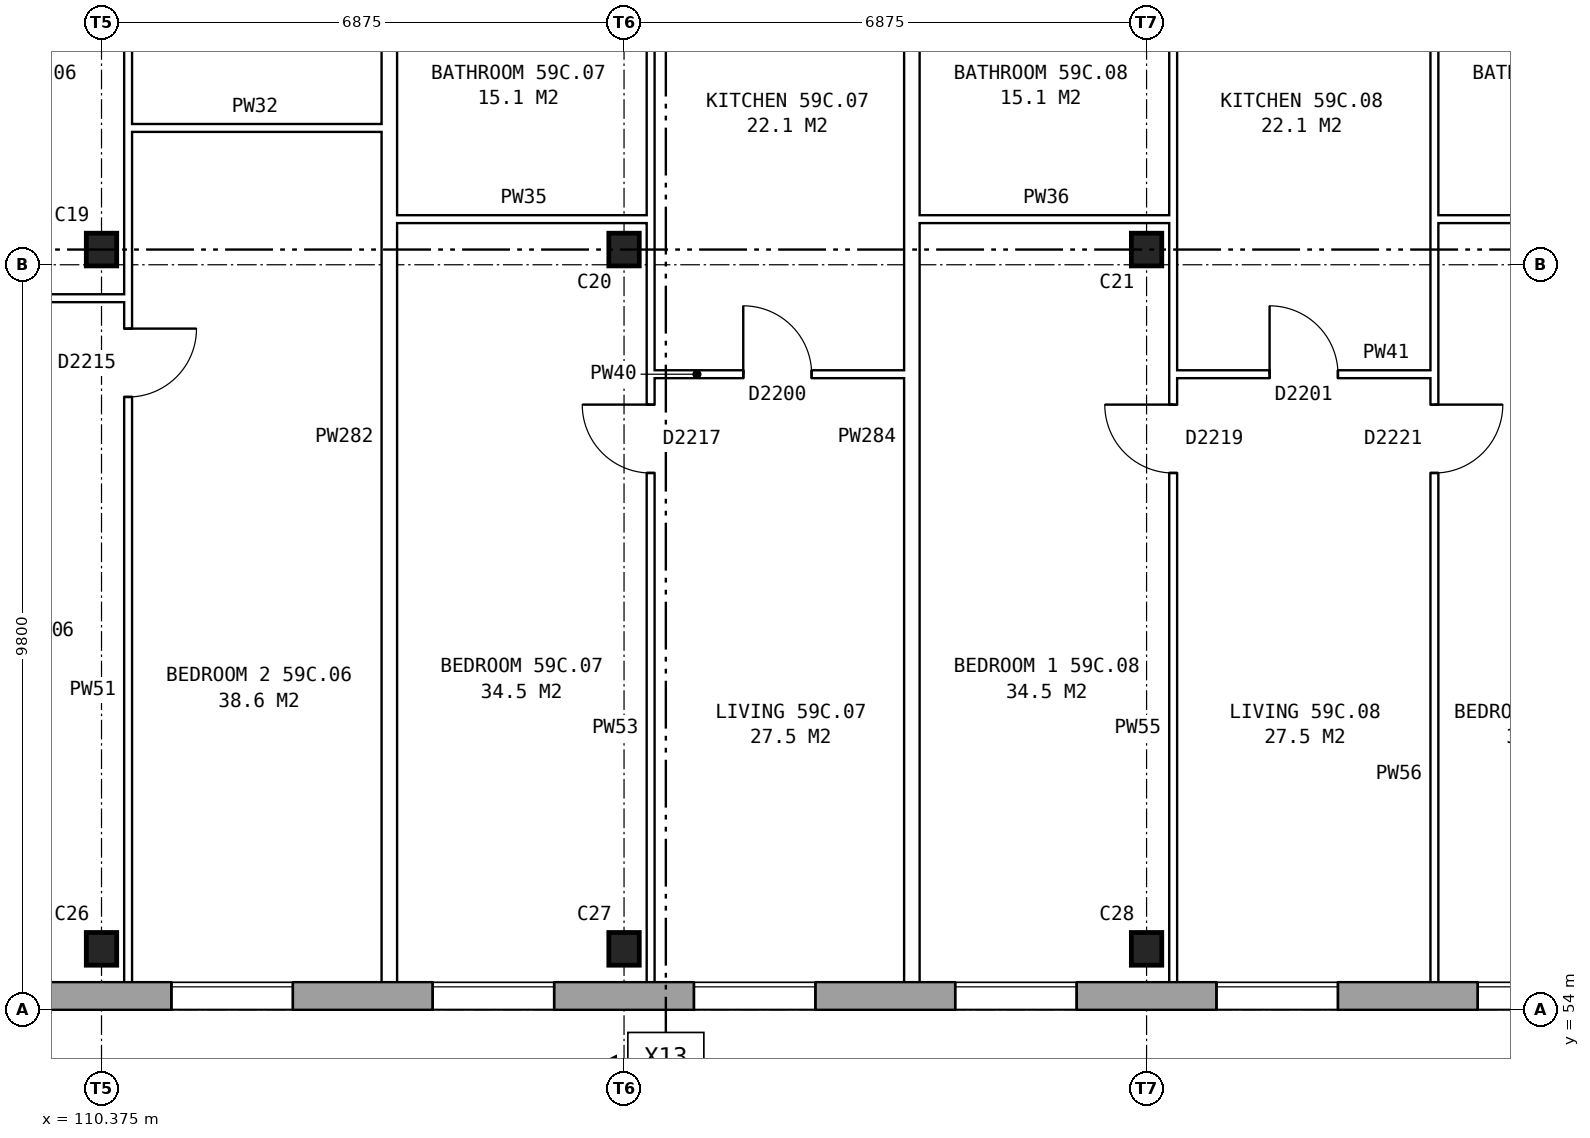
"""IFC4 building model, lengths in metres.
Left out: names, types, materials, properties, quantities, classifications, styles, units other than length and angle.
Written with IfcOpenShell. Run it as: python <this file> out.ifc"""

import sys

from ifc_helpers import new_model, si_unit, direction, frame, frame_2d, origin, origin_2d, place, context, subcontext, project, spatial, rectangle, i_section, extrude, element, fill, save


model = new_model("IFC4")
c1 = context("Model", 3, precision=1e-05, world=origin(), true_north=direction((0.0, 1.0)))
c2 = subcontext(c1, "Body", "Model", "MODEL_VIEW")
j1 = project(units=[si_unit("LENGTHUNIT", "METRE"), si_unit("PLANEANGLEUNIT", "RADIAN")], contexts=[c1])
p1 = place(None, origin())
s1 = spatial("IfcSite", under=j1, at=p1, CompositionType="ELEMENT")
p2 = place(p1, origin())
s2 = spatial("IfcBuilding", under=s1, at=p2, CompositionType="ELEMENT")
p3 = place(p2, frame((0.0, 0.0, 209.0)))
s3 = spatial("IfcBuildingStorey", under=s2, at=p3, CompositionType="ELEMENT", Elevation=209.0)
for number, where, z_axis, x_axis in (
    (1, (110.375, 54.8, 0.0), (0.0, 0.0, 1.0), (1.0, 0.0, 0.0)),
    (2, (117.25, 54.8, 0.0), (0.0, 0.0, 1.0), (1.0, 0.0, 0.0)),
    (3, (124.125, 54.8, 0.0), (0.0, 0.0, 1.0), (1.0, 0.0, 0.0)),
    (4, (110.375, 64.0, 0.0), (0.0, 0.0, 1.0), (1.0, 0.0, 0.0)),
    (5, (117.25, 64.0, 0.0), (0.0, 0.0, 1.0), (1.0, 0.0, 0.0)),
    (6, (124.125, 64.0, 0.0), (0.0, 0.0, 1.0), (1.0, 0.0, 0.0)),
):
    element("IfcColumn", number, at=place(p3, frame(where, z_axis=z_axis, x_axis=x_axis)), inside=s3, PredefinedType="COLUMN", context=c2, shape_type="SweptSolid", body=[
        extrude(i_section(OverallWidth=0.4, OverallDepth=0.43, WebThickness=0.04, FlangeThickness=0.04, at=origin_2d()), origin(), (0.0, 0.0, 1.0), 2.85),
    ])
p4 = place(p3, frame((75.95, 54.18, 0.0), z_axis=(0.0, 0.0, 1.0), x_axis=(1.0, 0.0, 0.0)))
e7 = element("IfcWall", 7, at=p4, inside=s3, PredefinedType="STANDARD", context=c2, shape_type="SweptSolid", body=[
    extrude(rectangle(XDim=55.1, YDim=0.36, at=frame_2d((27.55, 0.0))), origin(), (0.0, 0.0, 1.0), 2.85),
])
p5 = place(p4, frame((0.969, 0.0, 0.8)))
e8 = element("IfcOpeningElement", 8, at=p5, cuts=e7, PredefinedType="OPENING", context=c2, shape_type="SweptSolid", body=[
    extrude(rectangle(XDim=1.6, YDim=1.8, at=frame_2d((0.8, 0.9))), frame((0.0, 0.19, 0.0), z_axis=(0.0, -1.0, 0.0), x_axis=(1.0, 0.0, 0.0)), (0.0, 0.0, 1.0), 0.38),
])
p6 = place(p4, frame((4.406, 0.0, 0.8)))
e9 = element("IfcOpeningElement", 9, at=p6, cuts=e7, PredefinedType="OPENING", context=c2, shape_type="SweptSolid", body=[
    extrude(rectangle(XDim=1.6, YDim=1.8, at=frame_2d((0.8, 0.9))), frame((0.0, 0.19, 0.0), z_axis=(0.0, -1.0, 0.0), x_axis=(1.0, 0.0, 0.0)), (0.0, 0.0, 1.0), 0.38),
])
p7 = place(p4, frame((7.844, 0.0, 0.8)))
e10 = element("IfcOpeningElement", 10, at=p7, cuts=e7, PredefinedType="OPENING", context=c2, shape_type="SweptSolid", body=[
    extrude(rectangle(XDim=1.6, YDim=1.8, at=frame_2d((0.8, 0.9))), frame((0.0, 0.19, 0.0), z_axis=(0.0, -1.0, 0.0), x_axis=(1.0, 0.0, 0.0)), (0.0, 0.0, 1.0), 0.38),
])
p8 = place(p4, frame((11.281, 0.0, 0.8)))
e11 = element("IfcOpeningElement", 11, at=p8, cuts=e7, PredefinedType="OPENING", context=c2, shape_type="SweptSolid", body=[
    extrude(rectangle(XDim=1.6, YDim=1.8, at=frame_2d((0.8, 0.9))), frame((0.0, 0.19, 0.0), z_axis=(0.0, -1.0, 0.0), x_axis=(1.0, 0.0, 0.0)), (0.0, 0.0, 1.0), 0.38),
])
p9 = place(p4, frame((14.719, 0.0, 0.8)))
e12 = element("IfcOpeningElement", 12, at=p9, cuts=e7, PredefinedType="OPENING", context=c2, shape_type="SweptSolid", body=[
    extrude(rectangle(XDim=1.6, YDim=1.8, at=frame_2d((0.8, 0.9))), frame((0.0, 0.19, 0.0), z_axis=(0.0, -1.0, 0.0), x_axis=(1.0, 0.0, 0.0)), (0.0, 0.0, 1.0), 0.38),
])
p10 = place(p4, frame((18.156, 0.0, 0.8)))
e13 = element("IfcOpeningElement", 13, at=p10, cuts=e7, PredefinedType="OPENING", context=c2, shape_type="SweptSolid", body=[
    extrude(rectangle(XDim=1.6, YDim=1.8, at=frame_2d((0.8, 0.9))), frame((0.0, 0.19, 0.0), z_axis=(0.0, -1.0, 0.0), x_axis=(1.0, 0.0, 0.0)), (0.0, 0.0, 1.0), 0.38),
])
p11 = place(p4, frame((21.594, 0.0, 0.8)))
e14 = element("IfcOpeningElement", 14, at=p11, cuts=e7, PredefinedType="OPENING", context=c2, shape_type="SweptSolid", body=[
    extrude(rectangle(XDim=1.6, YDim=1.8, at=frame_2d((0.8, 0.9))), frame((0.0, 0.19, 0.0), z_axis=(0.0, -1.0, 0.0), x_axis=(1.0, 0.0, 0.0)), (0.0, 0.0, 1.0), 0.38),
])
p12 = place(p4, frame((25.031, 0.0, 0.8)))
e15 = element("IfcOpeningElement", 15, at=p12, cuts=e7, PredefinedType="OPENING", context=c2, shape_type="SweptSolid", body=[
    extrude(rectangle(XDim=1.6, YDim=1.8, at=frame_2d((0.8, 0.9))), frame((0.0, 0.19, 0.0), z_axis=(0.0, -1.0, 0.0), x_axis=(1.0, 0.0, 0.0)), (0.0, 0.0, 1.0), 0.38),
])
p13 = place(p4, frame((28.469, 0.0, 0.8)))
e16 = element("IfcOpeningElement", 16, at=p13, cuts=e7, PredefinedType="OPENING", context=c2, shape_type="SweptSolid", body=[
    extrude(rectangle(XDim=1.6, YDim=1.8, at=frame_2d((0.8, 0.9))), frame((0.0, 0.19, 0.0), z_axis=(0.0, -1.0, 0.0), x_axis=(1.0, 0.0, 0.0)), (0.0, 0.0, 1.0), 0.38),
])
p14 = place(p4, frame((31.906, 0.0, 0.8)))
e17 = element("IfcOpeningElement", 17, at=p14, cuts=e7, PredefinedType="OPENING", context=c2, shape_type="SweptSolid", body=[
    extrude(rectangle(XDim=1.6, YDim=1.8, at=frame_2d((0.8, 0.9))), frame((0.0, 0.19, 0.0), z_axis=(0.0, -1.0, 0.0), x_axis=(1.0, 0.0, 0.0)), (0.0, 0.0, 1.0), 0.38),
])
p15 = place(p4, frame((35.344, 0.0, 0.8)))
e18 = element("IfcOpeningElement", 18, at=p15, cuts=e7, PredefinedType="OPENING", context=c2, shape_type="SweptSolid", body=[
    extrude(rectangle(XDim=1.6, YDim=1.8, at=frame_2d((0.8, 0.9))), frame((0.0, 0.19, 0.0), z_axis=(0.0, -1.0, 0.0), x_axis=(1.0, 0.0, 0.0)), (0.0, 0.0, 1.0), 0.38),
])
p16 = place(p4, frame((38.781, 0.0, 0.8)))
e19 = element("IfcOpeningElement", 19, at=p16, cuts=e7, PredefinedType="OPENING", context=c2, shape_type="SweptSolid", body=[
    extrude(rectangle(XDim=1.6, YDim=1.8, at=frame_2d((0.8, 0.9))), frame((0.0, 0.19, 0.0), z_axis=(0.0, -1.0, 0.0), x_axis=(1.0, 0.0, 0.0)), (0.0, 0.0, 1.0), 0.38),
])
p17 = place(p4, frame((42.219, 0.0, 0.8)))
e20 = element("IfcOpeningElement", 20, at=p17, cuts=e7, PredefinedType="OPENING", context=c2, shape_type="SweptSolid", body=[
    extrude(rectangle(XDim=1.6, YDim=1.8, at=frame_2d((0.8, 0.9))), frame((0.0, 0.19, 0.0), z_axis=(0.0, -1.0, 0.0), x_axis=(1.0, 0.0, 0.0)), (0.0, 0.0, 1.0), 0.38),
])
p18 = place(p4, frame((45.656, 0.0, 0.8)))
e21 = element("IfcOpeningElement", 21, at=p18, cuts=e7, PredefinedType="OPENING", context=c2, shape_type="SweptSolid", body=[
    extrude(rectangle(XDim=1.6, YDim=1.8, at=frame_2d((0.8, 0.9))), frame((0.0, 0.19, 0.0), z_axis=(0.0, -1.0, 0.0), x_axis=(1.0, 0.0, 0.0)), (0.0, 0.0, 1.0), 0.38),
])
p19 = place(p4, frame((49.094, 0.0, 0.8)))
e22 = element("IfcOpeningElement", 22, at=p19, cuts=e7, PredefinedType="OPENING", context=c2, shape_type="SweptSolid", body=[
    extrude(rectangle(XDim=1.6, YDim=1.8, at=frame_2d((0.8, 0.9))), frame((0.0, 0.19, 0.0), z_axis=(0.0, -1.0, 0.0), x_axis=(1.0, 0.0, 0.0)), (0.0, 0.0, 1.0), 0.38),
])
p20 = place(p4, frame((52.531, 0.0, 0.8)))
e23 = element("IfcOpeningElement", 23, at=p20, cuts=e7, PredefinedType="OPENING", context=c2, shape_type="SweptSolid", body=[
    extrude(rectangle(XDim=1.6, YDim=1.8, at=frame_2d((0.8, 0.9))), frame((0.0, 0.19, 0.0), z_axis=(0.0, -1.0, 0.0), x_axis=(1.0, 0.0, 0.0)), (0.0, 0.0, 1.0), 0.38),
])
p21 = place(p3, frame((117.6, 62.36, 0.0), z_axis=(0.0, 0.0, 1.0), x_axis=(1.0, 0.0, 0.0)))
e24 = element("IfcWall", 24, at=p21, inside=s3, PredefinedType="PARTITIONING", context=c2, shape_type="SweptSolid", body=[
    extrude(rectangle(XDim=3.337, YDim=0.1, at=frame_2d((1.668, 0.0))), origin(), (0.0, 0.0, 1.0), 2.85),
])
p22 = place(p21, frame((1.219, 0.0, 0.0)))
e25 = element("IfcOpeningElement", 25, at=p22, cuts=e24, PredefinedType="OPENING", context=c2, shape_type="SweptSolid", body=[
    extrude(rectangle(XDim=0.9, YDim=2.1, at=frame_2d((0.45, 1.05))), frame((0.0, 0.06, 0.0), z_axis=(0.0, -1.0, 0.0), x_axis=(1.0, 0.0, 0.0)), (0.0, 0.0, 1.0), 0.12),
])
p23 = place(p3, frame((124.475, 62.36, 0.0), z_axis=(0.0, 0.0, 1.0), x_axis=(1.0, 0.0, 0.0)))
e26 = element("IfcWall", 26, at=p23, inside=s3, PredefinedType="PARTITIONING", context=c2, shape_type="SweptSolid", body=[
    extrude(rectangle(XDim=3.437, YDim=0.1, at=frame_2d((1.719, 0.0))), origin(), (0.0, 0.0, 1.0), 2.85),
])
p24 = place(p23, frame((1.269, 0.0, 0.0)))
e27 = element("IfcOpeningElement", 27, at=p24, cuts=e26, PredefinedType="OPENING", context=c2, shape_type="SweptSolid", body=[
    extrude(rectangle(XDim=0.9, YDim=2.1, at=frame_2d((0.45, 1.05))), frame((0.0, 0.06, 0.0), z_axis=(0.0, -1.0, 0.0), x_axis=(1.0, 0.0, 0.0)), (0.0, 0.0, 1.0), 0.12),
])
p25 = place(p3, frame((107.287, 63.36, 0.0), z_axis=(0.0, 0.0, 1.0), x_axis=(1.0, 0.0, 0.0)))
e28 = element("IfcWall", 28, at=p25, inside=s3, PredefinedType="PARTITIONING", context=c2, shape_type="SweptSolid", body=[
    extrude(rectangle(XDim=3.438, YDim=0.1, at=frame_2d((1.719, 0.0))), origin(), (0.0, 0.0, 1.0), 2.85),
])
p26 = place(p25, frame((1.269, 0.0, 0.0)))
e29 = element("IfcOpeningElement", 29, at=p26, cuts=e28, PredefinedType="OPENING", context=c2, shape_type="SweptSolid", body=[
    extrude(rectangle(XDim=0.9, YDim=2.1, at=frame_2d((0.45, 1.05))), frame((0.0, 0.06, 0.0), z_axis=(0.0, -1.0, 0.0), x_axis=(1.0, 0.0, 0.0)), (0.0, 0.0, 1.0), 0.12),
])
for number, where, z_axis, x_axis in (
    (30, (114.262, 64.4, 0.0), (0.0, 0.0, 1.0), (1.0, 0.0, 0.0)),
    (31, (121.137, 64.4, 0.0), (0.0, 0.0, 1.0), (1.0, 0.0, 0.0)),
):
    element("IfcWall", number, at=place(p3, frame(where, z_axis=z_axis, x_axis=x_axis)), inside=s3, PredefinedType="PARTITIONING", context=c2, shape_type="SweptSolid", body=[
        extrude(rectangle(XDim=3.338, YDim=0.1, at=frame_2d((1.669, 0.0))), origin(), (0.0, 0.0, 1.0), 2.85),
    ])
p27 = place(p3, frame((127.912, 64.4, 0.0), z_axis=(0.0, 0.0, 1.0), x_axis=(1.0, 0.0, 0.0)))
e32 = element("IfcWall", 32, at=p27, inside=s3, PredefinedType="PARTITIONING", context=c2, shape_type="SweptSolid", body=[
    extrude(rectangle(XDim=3.448, YDim=0.1, at=frame_2d((1.724, 0.0))), origin(), (0.0, 0.0, 1.0), 2.85),
])
p28 = place(p3, frame((110.725, 65.6, 0.0), z_axis=(0.0, 0.0, 1.0), x_axis=(1.0, 0.0, 0.0)))
e33 = element("IfcWall", 33, at=p28, inside=s3, PredefinedType="PARTITIONING", context=c2, shape_type="SweptSolid", body=[
    extrude(rectangle(XDim=3.337, YDim=0.1, at=frame_2d((1.668, 0.0))), origin(), (0.0, 0.0, 1.0), 2.85),
])
p29 = place(p3, frame((110.725, 54.36, 0.0), z_axis=(0.0, 0.0, 1.0), x_axis=(0.0, 1.0, 0.0)))
e34 = element("IfcWall", 34, at=p29, inside=s3, PredefinedType="PARTITIONING", context=c2, shape_type="SweptSolid", body=[
    extrude(rectangle(XDim=14.34, YDim=0.1, at=frame_2d((7.17, 0.0))), origin(), (0.0, 0.0, 1.0), 2.85),
])
p30 = place(p29, frame((7.7, 0.0, 0.0)))
e35 = element("IfcOpeningElement", 35, at=p30, cuts=e34, PredefinedType="OPENING", context=c2, shape_type="SweptSolid", body=[
    extrude(rectangle(XDim=0.9, YDim=2.1, at=frame_2d((0.45, 1.05))), frame((0.0, 0.06, 0.0), z_axis=(0.0, -1.0, 0.0), x_axis=(1.0, 0.0, 0.0)), (0.0, 0.0, 1.0), 0.12),
])
p31 = place(p29, frame((13.04, 0.0, 0.0)))
e36 = element("IfcOpeningElement", 36, at=p31, cuts=e34, PredefinedType="OPENING", context=c2, shape_type="SweptSolid", body=[
    extrude(rectangle(XDim=0.9, YDim=2.1, at=frame_2d((0.45, 1.05))), frame((0.0, 0.06, 0.0), z_axis=(0.0, -1.0, 0.0), x_axis=(1.0, 0.0, 0.0)), (0.0, 0.0, 1.0), 0.12),
])
p32 = place(p3, frame((114.162, 54.36, 0.0), z_axis=(0.0, 0.0, 1.0), x_axis=(0.0, 1.0, 0.0)))
e37 = element("IfcWall", 37, at=p32, inside=s3, PredefinedType="PARTITIONING", context=c2, shape_type="SweptSolid", body=[
    extrude(rectangle(XDim=14.34, YDim=0.2, at=frame_2d((7.17, 0.0))), origin(), (0.0, 0.0, 1.0), 2.85),
])
p33 = place(p3, frame((117.6, 54.36, 0.0), z_axis=(0.0, 0.0, 1.0), x_axis=(0.0, 1.0, 0.0)))
e38 = element("IfcWall", 38, at=p33, inside=s3, PredefinedType="PARTITIONING", context=c2, shape_type="SweptSolid", body=[
    extrude(rectangle(XDim=14.34, YDim=0.1, at=frame_2d((7.17, 0.0))), origin(), (0.0, 0.0, 1.0), 2.85),
])
p34 = place(p33, frame((6.7, 0.0, 0.0)))
e39 = element("IfcOpeningElement", 39, at=p34, cuts=e38, PredefinedType="OPENING", context=c2, shape_type="SweptSolid", body=[
    extrude(rectangle(XDim=0.9, YDim=2.1, at=frame_2d((0.45, 1.05))), frame((0.0, 0.06, 0.0), z_axis=(0.0, -1.0, 0.0), x_axis=(1.0, 0.0, 0.0)), (0.0, 0.0, 1.0), 0.12),
])
p35 = place(p33, frame((13.04, 0.0, 0.0)))
e40 = element("IfcOpeningElement", 40, at=p35, cuts=e38, PredefinedType="OPENING", context=c2, shape_type="SweptSolid", body=[
    extrude(rectangle(XDim=0.9, YDim=2.1, at=frame_2d((0.45, 1.05))), frame((0.0, 0.06, 0.0), z_axis=(0.0, -1.0, 0.0), x_axis=(1.0, 0.0, 0.0)), (0.0, 0.0, 1.0), 0.12),
])
p36 = place(p3, frame((121.037, 54.36, 0.0), z_axis=(0.0, 0.0, 1.0), x_axis=(0.0, 1.0, 0.0)))
e41 = element("IfcWall", 41, at=p36, inside=s3, PredefinedType="PARTITIONING", context=c2, shape_type="SweptSolid", body=[
    extrude(rectangle(XDim=14.34, YDim=0.2, at=frame_2d((7.17, 0.0))), origin(), (0.0, 0.0, 1.0), 2.85),
])
p37 = place(p3, frame((124.475, 54.36, 0.0), z_axis=(0.0, 0.0, 1.0), x_axis=(0.0, 1.0, 0.0)))
e42 = element("IfcWall", 42, at=p37, inside=s3, PredefinedType="PARTITIONING", context=c2, shape_type="SweptSolid", body=[
    extrude(rectangle(XDim=14.34, YDim=0.1, at=frame_2d((7.17, 0.0))), origin(), (0.0, 0.0, 1.0), 2.85),
])
p38 = place(p37, frame((6.7, 0.0, 0.0)))
e43 = element("IfcOpeningElement", 43, at=p38, cuts=e42, PredefinedType="OPENING", context=c2, shape_type="SweptSolid", body=[
    extrude(rectangle(XDim=0.9, YDim=2.1, at=frame_2d((0.45, 1.05))), frame((0.0, 0.06, 0.0), z_axis=(0.0, -1.0, 0.0), x_axis=(1.0, 0.0, 0.0)), (0.0, 0.0, 1.0), 0.12),
])
p39 = place(p37, frame((13.04, 0.0, 0.0)))
e44 = element("IfcOpeningElement", 44, at=p39, cuts=e42, PredefinedType="OPENING", context=c2, shape_type="SweptSolid", body=[
    extrude(rectangle(XDim=0.9, YDim=2.1, at=frame_2d((0.45, 1.05))), frame((0.0, 0.06, 0.0), z_axis=(0.0, -1.0, 0.0), x_axis=(1.0, 0.0, 0.0)), (0.0, 0.0, 1.0), 0.12),
])
p40 = place(p3, frame((127.912, 54.36, 0.0), z_axis=(0.0, 0.0, 1.0), x_axis=(0.0, 1.0, 0.0)))
e45 = element("IfcWall", 45, at=p40, inside=s3, PredefinedType="PARTITIONING", context=c2, shape_type="SweptSolid", body=[
    extrude(rectangle(XDim=14.34, YDim=0.1, at=frame_2d((7.17, 0.0))), origin(), (0.0, 0.0, 1.0), 2.85),
])
p41 = place(p40, frame((6.7, 0.0, 0.0)))
e46 = element("IfcOpeningElement", 46, at=p41, cuts=e45, PredefinedType="OPENING", context=c2, shape_type="SweptSolid", body=[
    extrude(rectangle(XDim=0.9, YDim=2.1, at=frame_2d((0.45, 1.05))), frame((0.0, 0.06, 0.0), z_axis=(0.0, -1.0, 0.0), x_axis=(1.0, 0.0, 0.0)), (0.0, 0.0, 1.0), 0.12),
])
p42 = place(p40, frame((13.04, 0.0, 0.0)))
e47 = element("IfcOpeningElement", 47, at=p42, cuts=e45, PredefinedType="OPENING", context=c2, shape_type="SweptSolid", body=[
    extrude(rectangle(XDim=0.9, YDim=2.1, at=frame_2d((0.45, 1.05))), frame((0.0, 0.06, 0.0), z_axis=(0.0, -1.0, 0.0), x_axis=(1.0, 0.0, 0.0)), (0.0, 0.0, 1.0), 0.12),
])
p43 = place(p15, origin())
e48 = element("IfcWindow", 48, at=p43, inside=s3, PartitioningType="SINGLE_PANEL", PredefinedType="WINDOW", context=c2, shape_type="SweptSolid", body=[
    extrude(rectangle(XDim=1.6, YDim=1.8, at=frame_2d((0.8, 0.9))), frame((0.0, 0.15, 0.0), z_axis=(0.0, -1.0, 0.0), x_axis=(1.0, 0.0, 0.0)), (0.0, 0.0, 1.0), 0.06),
])
fill(e18, e48)
p44 = place(p16, origin())
e49 = element("IfcWindow", 49, at=p44, inside=s3, PartitioningType="SINGLE_PANEL", PredefinedType="WINDOW", context=c2, shape_type="SweptSolid", body=[
    extrude(rectangle(XDim=1.6, YDim=1.8, at=frame_2d((0.8, 0.9))), frame((0.0, 0.15, 0.0), z_axis=(0.0, -1.0, 0.0), x_axis=(1.0, 0.0, 0.0)), (0.0, 0.0, 1.0), 0.06),
])
fill(e19, e49)
p45 = place(p17, origin())
e50 = element("IfcWindow", 50, at=p45, inside=s3, PartitioningType="SINGLE_PANEL", PredefinedType="WINDOW", context=c2, shape_type="SweptSolid", body=[
    extrude(rectangle(XDim=1.6, YDim=1.8, at=frame_2d((0.8, 0.9))), frame((0.0, 0.15, 0.0), z_axis=(0.0, -1.0, 0.0), x_axis=(1.0, 0.0, 0.0)), (0.0, 0.0, 1.0), 0.06),
])
fill(e20, e50)
p46 = place(p18, origin())
e51 = element("IfcWindow", 51, at=p46, inside=s3, PartitioningType="SINGLE_PANEL", PredefinedType="WINDOW", context=c2, shape_type="SweptSolid", body=[
    extrude(rectangle(XDim=1.6, YDim=1.8, at=frame_2d((0.8, 0.9))), frame((0.0, 0.15, 0.0), z_axis=(0.0, -1.0, 0.0), x_axis=(1.0, 0.0, 0.0)), (0.0, 0.0, 1.0), 0.06),
])
fill(e21, e51)
p47 = place(p19, origin())
e52 = element("IfcWindow", 52, at=p47, inside=s3, PartitioningType="SINGLE_PANEL", PredefinedType="WINDOW", context=c2, shape_type="SweptSolid", body=[
    extrude(rectangle(XDim=1.6, YDim=1.8, at=frame_2d((0.8, 0.9))), frame((0.0, 0.15, 0.0), z_axis=(0.0, -1.0, 0.0), x_axis=(1.0, 0.0, 0.0)), (0.0, 0.0, 1.0), 0.06),
])
fill(e22, e52)
p48 = place(p20, origin())
e53 = element("IfcWindow", 53, at=p48, inside=s3, PartitioningType="SINGLE_PANEL", PredefinedType="WINDOW", context=c2, shape_type="SweptSolid", body=[
    extrude(rectangle(XDim=1.6, YDim=1.8, at=frame_2d((0.8, 0.9))), frame((0.0, 0.15, 0.0), z_axis=(0.0, -1.0, 0.0), x_axis=(1.0, 0.0, 0.0)), (0.0, 0.0, 1.0), 0.06),
])
fill(e23, e53)
p49 = place(p30, frame((0.9, 0.0, 0.0), z_axis=(0.0, 0.0, 1.0), x_axis=(-1.0, 0.0, 0.0)))
e54 = element("IfcDoor", 54, at=p49, inside=s3, OperationType="SINGLE_SWING_LEFT", PredefinedType="DOOR", context=c2, shape_type="SweptSolid", body=[
    extrude(rectangle(XDim=0.9, YDim=2.1, at=frame_2d((0.45, 1.05))), frame((0.0, 0.025, 0.0), z_axis=(0.0, -1.0, 0.0), x_axis=(1.0, 0.0, 0.0)), (0.0, 0.0, 1.0), 0.05),
])
fill(e35, e54)
p50 = place(p34, origin())
e55 = element("IfcDoor", 55, at=p50, inside=s3, OperationType="SINGLE_SWING_RIGHT", PredefinedType="DOOR", context=c2, shape_type="SweptSolid", body=[
    extrude(rectangle(XDim=0.9, YDim=2.1, at=frame_2d((0.45, 1.05))), frame((0.0, 0.025, 0.0), z_axis=(0.0, -1.0, 0.0), x_axis=(1.0, 0.0, 0.0)), (0.0, 0.0, 1.0), 0.05),
])
fill(e39, e55)
p51 = place(p22, origin())
e56 = element("IfcDoor", 56, at=p51, inside=s3, OperationType="SINGLE_SWING_LEFT", PredefinedType="DOOR", context=c2, shape_type="SweptSolid", body=[
    extrude(rectangle(XDim=0.9, YDim=2.1, at=frame_2d((0.45, 1.05))), frame((0.0, 0.025, 0.0), z_axis=(0.0, -1.0, 0.0), x_axis=(1.0, 0.0, 0.0)), (0.0, 0.0, 1.0), 0.05),
])
fill(e25, e56)
p52 = place(p38, origin())
e57 = element("IfcDoor", 57, at=p52, inside=s3, OperationType="SINGLE_SWING_RIGHT", PredefinedType="DOOR", context=c2, shape_type="SweptSolid", body=[
    extrude(rectangle(XDim=0.9, YDim=2.1, at=frame_2d((0.45, 1.05))), frame((0.0, 0.025, 0.0), z_axis=(0.0, -1.0, 0.0), x_axis=(1.0, 0.0, 0.0)), (0.0, 0.0, 1.0), 0.05),
])
fill(e43, e57)
p53 = place(p41, frame((0.9, 0.0, 0.0), z_axis=(0.0, 0.0, 1.0), x_axis=(-1.0, 0.0, 0.0)))
e58 = element("IfcDoor", 58, at=p53, inside=s3, OperationType="SINGLE_SWING_LEFT", PredefinedType="DOOR", context=c2, shape_type="SweptSolid", body=[
    extrude(rectangle(XDim=0.9, YDim=2.1, at=frame_2d((0.45, 1.05))), frame((0.0, 0.025, 0.0), z_axis=(0.0, -1.0, 0.0), x_axis=(1.0, 0.0, 0.0)), (0.0, 0.0, 1.0), 0.05),
])
fill(e46, e58)
p54 = place(p24, origin())
e59 = element("IfcDoor", 59, at=p54, inside=s3, OperationType="SINGLE_SWING_LEFT", PredefinedType="DOOR", context=c2, shape_type="SweptSolid", body=[
    extrude(rectangle(XDim=0.9, YDim=2.1, at=frame_2d((0.45, 1.05))), frame((0.0, 0.025, 0.0), z_axis=(0.0, -1.0, 0.0), x_axis=(1.0, 0.0, 0.0)), (0.0, 0.0, 1.0), 0.05),
])
fill(e27, e59)
save(model, sys.argv[1])
